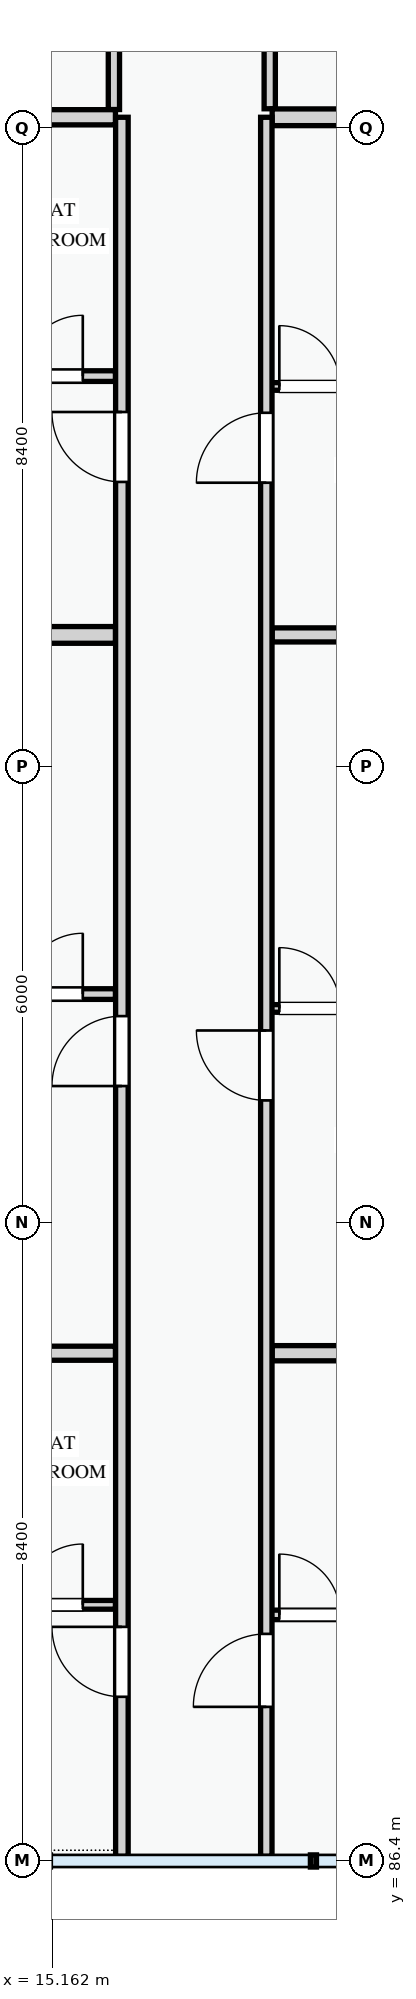
"""IFC4 building model, lengths in metres.
Left out: names, types, materials, properties, quantities, classifications, styles, units other than length and angle.
Written with IfcOpenShell. Run it as: python <this file> out.ifc"""

import sys

from ifc_helpers import new_model, si_unit, direction, frame, frame_2d, origin, place, context, subcontext, project, spatial, rectangle, extrude, element, fill, save


model = new_model("IFC4")
c1 = context("Model", 3, precision=1e-05, world=origin(), true_north=direction((0.0, 1.0)))
c2 = subcontext(c1, "Body", "Model", "MODEL_VIEW")
j1 = project(units=[si_unit("LENGTHUNIT", "METRE"), si_unit("PLANEANGLEUNIT", "RADIAN")], contexts=[c1])
p1 = place(None, origin())
s1 = spatial("IfcSite", under=j1, at=p1, CompositionType="ELEMENT")
p2 = place(p1, origin())
s2 = spatial("IfcBuilding", under=s1, at=p2, CompositionType="ELEMENT")
p3 = place(p2, frame((0.0, 0.0, 37.8)))
s3 = spatial("IfcBuildingStorey", under=s2, at=p3, CompositionType="ELEMENT", Elevation=37.8)
p4 = place(p3, frame((15.975, 113.324, 0.0), z_axis=(0.0, 0.0, 1.0), x_axis=(0.0, -1.0, 0.0)))
e1 = element("IfcWall", 1, at=p4, inside=s3, PredefinedType="PARTITIONING", context=c2, shape_type="SweptSolid", body=[
    extrude(rectangle(XDim=3.882, YDim=0.148, at=frame_2d((1.941, 0.0))), origin(), (0.0, 0.0, 1.0), 3.0),
])
p5 = place(p3, frame((18.025, 113.324, 0.0), z_axis=(0.0, 0.0, 1.0), x_axis=(0.0, -1.0, 0.0)))
e2 = element("IfcWall", 2, at=p5, inside=s3, PredefinedType="PARTITIONING", context=c2, shape_type="SweptSolid", body=[
    extrude(rectangle(XDim=3.872, YDim=0.148, at=frame_2d((1.936, 0.0))), origin(), (0.0, 0.0, 1.0), 3.0),
])
p6 = place(p3, frame((8.53, 89.77, 0.0), z_axis=(0.0, 0.0, 1.0), x_axis=(1.0, 0.0, 0.0)))
e3 = element("IfcWall", 3, at=p6, inside=s3, PredefinedType="PARTITIONING", context=c2, shape_type="SweptSolid", body=[
    extrude(rectangle(XDim=7.466, YDim=0.115, at=frame_2d((3.733, 0.0))), origin(), (0.0, 0.0, 1.0), 3.0),
])
p7 = place(p6, frame((1.334, 0.0, 0.0)))
e4 = element("IfcOpeningElement", 4, at=p7, cuts=e3, PredefinedType="OPENING", context=c2, shape_type="SweptSolid", body=[
    extrude(rectangle(XDim=0.85, YDim=2.1, at=frame_2d((0.425, 1.05))), frame((0.0, 0.067, 0.0), z_axis=(0.0, -1.0, 0.0), x_axis=(1.0, 0.0, 0.0)), (0.0, 0.0, 1.0), 0.135),
])
p8 = place(p6, frame((4.23, 0.0, 0.0)))
e5 = element("IfcOpeningElement", 5, at=p8, cuts=e3, PredefinedType="OPENING", context=c2, shape_type="SweptSolid", body=[
    extrude(rectangle(XDim=0.85, YDim=2.1, at=frame_2d((0.425, 1.05))), frame((0.0, 0.067, 0.0), z_axis=(0.0, -1.0, 0.0), x_axis=(1.0, 0.0, 0.0)), (0.0, 0.0, 1.0), 0.135),
])
p9 = place(p6, frame((6.236, 0.0, 0.0)))
e6 = element("IfcOpeningElement", 6, at=p9, cuts=e3, PredefinedType="OPENING", context=c2, shape_type="SweptSolid", body=[
    extrude(rectangle(XDim=0.8, YDim=2.1, at=frame_2d((0.4, 1.05))), frame((0.0, 0.067, 0.0), z_axis=(0.0, -1.0, 0.0), x_axis=(1.0, 0.0, 0.0)), (0.0, 0.0, 1.0), 0.135),
])
p10 = place(p3, frame((17.98, 89.638, 0.0), z_axis=(0.0, 0.0, 1.0), x_axis=(1.0, 0.0, 0.0)))
e7 = element("IfcWall", 7, at=p10, inside=s3, PredefinedType="PARTITIONING", context=c2, shape_type="SweptSolid", body=[
    extrude(rectangle(XDim=4.69, YDim=0.125, at=frame_2d((2.345, 0.0))), origin(), (0.0, 0.0, 1.0), 3.0),
])
p11 = place(p10, frame((0.171, 0.0, 0.0)))
e8 = element("IfcOpeningElement", 8, at=p11, cuts=e7, PredefinedType="OPENING", context=c2, shape_type="SweptSolid", body=[
    extrude(rectangle(XDim=0.8, YDim=2.1, at=frame_2d((0.4, 1.05))), frame((0.0, 0.073, 0.0), z_axis=(0.0, -1.0, 0.0), x_axis=(1.0, 0.0, 0.0)), (0.0, 0.0, 1.0), 0.145),
])
p12 = place(p10, frame((1.384, 0.0, 0.0)))
e9 = element("IfcOpeningElement", 9, at=p12, cuts=e7, PredefinedType="OPENING", context=c2, shape_type="SweptSolid", body=[
    extrude(rectangle(XDim=0.85, YDim=2.1, at=frame_2d((0.425, 1.05))), frame((0.0, 0.073, 0.0), z_axis=(0.0, -1.0, 0.0), x_axis=(1.0, 0.0, 0.0)), (0.0, 0.0, 1.0), 0.145),
])
p13 = place(p10, frame((3.193, 0.0, 0.0)))
e10 = element("IfcOpeningElement", 10, at=p13, cuts=e7, PredefinedType="OPENING", context=c2, shape_type="SweptSolid", body=[
    extrude(rectangle(XDim=0.85, YDim=2.1, at=frame_2d((0.425, 1.05))), frame((0.0, 0.073, 0.0), z_axis=(0.0, -1.0, 0.0), x_axis=(1.0, 0.0, 0.0)), (0.0, 0.0, 1.0), 0.145),
])
p14 = place(p3, frame((8.53, 97.805, 0.0), z_axis=(0.0, 0.0, 1.0), x_axis=(1.0, 0.0, 0.0)))
e11 = element("IfcWall", 11, at=p14, inside=s3, PredefinedType="PARTITIONING", context=c2, shape_type="SweptSolid", body=[
    extrude(rectangle(XDim=7.466, YDim=0.14, at=frame_2d((3.733, 0.0))), origin(), (0.0, 0.0, 1.0), 3.0),
])
p15 = place(p14, frame((1.334, 0.0, 0.0)))
e12 = element("IfcOpeningElement", 12, at=p15, cuts=e11, PredefinedType="OPENING", context=c2, shape_type="SweptSolid", body=[
    extrude(rectangle(XDim=0.85, YDim=2.1, at=frame_2d((0.425, 1.05))), frame((0.0, 0.08, 0.0), z_axis=(0.0, -1.0, 0.0), x_axis=(1.0, 0.0, 0.0)), (0.0, 0.0, 1.0), 0.16),
])
p16 = place(p14, frame((4.23, 0.0, 0.0)))
e13 = element("IfcOpeningElement", 13, at=p16, cuts=e11, PredefinedType="OPENING", context=c2, shape_type="SweptSolid", body=[
    extrude(rectangle(XDim=0.82, YDim=2.08, at=frame_2d((0.41, 1.04))), frame((0.0, 0.08, 0.0), z_axis=(0.0, -1.0, 0.0), x_axis=(1.0, 0.0, 0.0)), (0.0, 0.0, 1.0), 0.16),
])
p17 = place(p14, frame((6.236, 0.0, 0.0)))
e14 = element("IfcOpeningElement", 14, at=p17, cuts=e11, PredefinedType="OPENING", context=c2, shape_type="SweptSolid", body=[
    extrude(rectangle(XDim=0.8, YDim=2.1, at=frame_2d((0.4, 1.05))), frame((0.0, 0.08, 0.0), z_axis=(0.0, -1.0, 0.0), x_axis=(1.0, 0.0, 0.0)), (0.0, 0.0, 1.0), 0.16),
])
p18 = place(p3, frame((17.98, 97.616, 0.0), z_axis=(0.0, 0.0, 1.0), x_axis=(1.0, 0.0, 0.0)))
e15 = element("IfcWall", 15, at=p18, inside=s3, PredefinedType="PARTITIONING", context=c2, shape_type="SweptSolid", body=[
    extrude(rectangle(XDim=4.76, YDim=0.1, at=frame_2d((2.38, 0.0))), origin(), (0.0, 0.0, 1.0), 3.0),
])
p19 = place(p18, frame((0.171, 0.0, 0.0)))
e16 = element("IfcOpeningElement", 16, at=p19, cuts=e15, PredefinedType="OPENING", context=c2, shape_type="SweptSolid", body=[
    extrude(rectangle(XDim=0.8, YDim=2.1, at=frame_2d((0.4, 1.05))), frame((0.0, 0.06, 0.0), z_axis=(0.0, -1.0, 0.0), x_axis=(1.0, 0.0, 0.0)), (0.0, 0.0, 1.0), 0.12),
])
p20 = place(p18, frame((1.384, 0.0, 0.0)))
e17 = element("IfcOpeningElement", 17, at=p20, cuts=e15, PredefinedType="OPENING", context=c2, shape_type="SweptSolid", body=[
    extrude(rectangle(XDim=0.85, YDim=2.1, at=frame_2d((0.425, 1.05))), frame((0.0, 0.06, 0.0), z_axis=(0.0, -1.0, 0.0), x_axis=(1.0, 0.0, 0.0)), (0.0, 0.0, 1.0), 0.12),
])
p21 = place(p18, frame((3.193, 0.0, 0.0)))
e18 = element("IfcOpeningElement", 18, at=p21, cuts=e15, PredefinedType="OPENING", context=c2, shape_type="SweptSolid", body=[
    extrude(rectangle(XDim=0.82, YDim=2.08, at=frame_2d((0.41, 1.04))), frame((0.0, 0.06, 0.0), z_axis=(0.0, -1.0, 0.0), x_axis=(1.0, 0.0, 0.0)), (0.0, 0.0, 1.0), 0.12),
])
p22 = place(p3, frame((8.53, 93.08, 0.0), z_axis=(0.0, 0.0, 1.0), x_axis=(1.0, 0.0, 0.0)))
e19 = element("IfcWall", 19, at=p22, inside=s3, PredefinedType="PARTITIONING", context=c2, shape_type="SweptSolid", body=[
    extrude(rectangle(XDim=7.466, YDim=0.185, at=frame_2d((3.733, 0.0))), origin(), (0.0, 0.0, 1.0), 3.0),
])
p23 = place(p3, frame((18.057, 93.08, 0.0), z_axis=(0.0, 0.0, 1.0), x_axis=(1.0, 0.0, 0.0)))
e20 = element("IfcWall", 20, at=p23, inside=s3, PredefinedType="PARTITIONING", context=c2, shape_type="SweptSolid", body=[
    extrude(rectangle(XDim=4.614, YDim=0.2, at=frame_2d((2.307, 0.0))), origin(), (0.0, 0.0, 1.0), 3.0),
])
p24 = place(p3, frame((8.53, 105.935, 0.0), z_axis=(0.0, 0.0, 1.0), x_axis=(1.0, 0.0, 0.0)))
e21 = element("IfcWall", 21, at=p24, inside=s3, PredefinedType="PARTITIONING", context=c2, shape_type="SweptSolid", body=[
    extrude(rectangle(XDim=7.466, YDim=0.14, at=frame_2d((3.733, 0.0))), origin(), (0.0, 0.0, 1.0), 3.0),
])
p25 = place(p24, frame((1.334, 0.0, 0.0)))
e22 = element("IfcOpeningElement", 22, at=p25, cuts=e21, PredefinedType="OPENING", context=c2, shape_type="SweptSolid", body=[
    extrude(rectangle(XDim=0.85, YDim=2.1, at=frame_2d((0.425, 1.05))), frame((0.0, 0.08, 0.0), z_axis=(0.0, -1.0, 0.0), x_axis=(1.0, 0.0, 0.0)), (0.0, 0.0, 1.0), 0.16),
])
p26 = place(p24, frame((4.23, 0.0, 0.0)))
e23 = element("IfcOpeningElement", 23, at=p26, cuts=e21, PredefinedType="OPENING", context=c2, shape_type="SweptSolid", body=[
    extrude(rectangle(XDim=0.85, YDim=2.1, at=frame_2d((0.425, 1.05))), frame((0.0, 0.08, 0.0), z_axis=(0.0, -1.0, 0.0), x_axis=(1.0, 0.0, 0.0)), (0.0, 0.0, 1.0), 0.16),
])
p27 = place(p24, frame((6.236, 0.0, 0.0)))
e24 = element("IfcOpeningElement", 24, at=p27, cuts=e21, PredefinedType="OPENING", context=c2, shape_type="SweptSolid", body=[
    extrude(rectangle(XDim=0.8, YDim=2.1, at=frame_2d((0.4, 1.05))), frame((0.0, 0.08, 0.0), z_axis=(0.0, -1.0, 0.0), x_axis=(1.0, 0.0, 0.0)), (0.0, 0.0, 1.0), 0.16),
])
p28 = place(p3, frame((17.98, 105.799, 0.0), z_axis=(0.0, 0.0, 1.0), x_axis=(1.0, 0.0, 0.0)))
e25 = element("IfcWall", 25, at=p28, inside=s3, PredefinedType="PARTITIONING", context=c2, shape_type="SweptSolid", body=[
    extrude(rectangle(XDim=4.69, YDim=0.1, at=frame_2d((2.345, 0.0))), origin(), (0.0, 0.0, 1.0), 3.0),
])
p29 = place(p28, frame((0.171, 0.0, 0.0)))
e26 = element("IfcOpeningElement", 26, at=p29, cuts=e25, PredefinedType="OPENING", context=c2, shape_type="SweptSolid", body=[
    extrude(rectangle(XDim=0.8, YDim=2.1, at=frame_2d((0.4, 1.05))), frame((0.0, 0.06, 0.0), z_axis=(0.0, -1.0, 0.0), x_axis=(1.0, 0.0, 0.0)), (0.0, 0.0, 1.0), 0.12),
])
p30 = place(p28, frame((1.384, 0.0, 0.0)))
e27 = element("IfcOpeningElement", 27, at=p30, cuts=e25, PredefinedType="OPENING", context=c2, shape_type="SweptSolid", body=[
    extrude(rectangle(XDim=0.85, YDim=2.1, at=frame_2d((0.425, 1.05))), frame((0.0, 0.06, 0.0), z_axis=(0.0, -1.0, 0.0), x_axis=(1.0, 0.0, 0.0)), (0.0, 0.0, 1.0), 0.12),
])
p31 = place(p28, frame((3.193, 0.0, 0.0)))
e28 = element("IfcOpeningElement", 28, at=p31, cuts=e25, PredefinedType="OPENING", context=c2, shape_type="SweptSolid", body=[
    extrude(rectangle(XDim=0.85, YDim=2.1, at=frame_2d((0.425, 1.05))), frame((0.0, 0.06, 0.0), z_axis=(0.0, -1.0, 0.0), x_axis=(1.0, 0.0, 0.0)), (0.0, 0.0, 1.0), 0.12),
])
p32 = place(p3, frame((8.53, 102.53, 0.0), z_axis=(0.0, 0.0, 1.0), x_axis=(1.0, 0.0, 0.0)))
e29 = element("IfcWall", 29, at=p32, inside=s3, PredefinedType="PARTITIONING", context=c2, shape_type="SweptSolid", body=[
    extrude(rectangle(XDim=7.466, YDim=0.22, at=frame_2d((3.733, 0.0))), origin(), (0.0, 0.0, 1.0), 3.0),
])
p33 = place(p3, frame((18.057, 102.53, 0.0), z_axis=(0.0, 0.0, 1.0), x_axis=(1.0, 0.0, 0.0)))
e30 = element("IfcWall", 30, at=p33, inside=s3, PredefinedType="PARTITIONING", context=c2, shape_type="SweptSolid", body=[
    extrude(rectangle(XDim=4.614, YDim=0.185, at=frame_2d((2.307, 0.0))), origin(), (0.0, 0.0, 1.0), 3.0),
])
p34 = place(p3, frame((8.53, 109.34, 0.0), z_axis=(0.0, 0.0, 1.0), x_axis=(1.0, 0.0, 0.0)))
e31 = element("IfcWall", 31, at=p34, inside=s3, PredefinedType="PARTITIONING", context=c2, shape_type="SweptSolid", body=[
    extrude(rectangle(XDim=7.466, YDim=0.2, at=frame_2d((3.733, 0.0))), origin(), (0.0, 0.0, 1.0), 2.375),
])
p35 = place(p3, frame((18.057, 109.34, 0.0), z_axis=(0.0, 0.0, 1.0), x_axis=(1.0, 0.0, 0.0)))
e32 = element("IfcWall", 32, at=p35, inside=s3, PredefinedType="PARTITIONING", context=c2, shape_type="SweptSolid", body=[
    extrude(rectangle(XDim=4.683, YDim=0.22, at=frame_2d((2.342, 0.0))), origin(), (0.0, 0.0, 1.0), 2.375),
])
p36 = place(p3, frame((16.08, 86.46, 0.0), z_axis=(0.0, 0.0, 1.0), x_axis=(0.0, 1.0, 0.0)))
e33 = element("IfcWall", 33, at=p36, inside=s3, PredefinedType="PARTITIONING", context=c2, shape_type="SweptSolid", body=[
    extrude(rectangle(XDim=22.88, YDim=0.165, at=frame_2d((11.44, 0.0))), origin(), (0.0, 0.0, 1.0), 3.0),
])
p37 = place(p36, frame((2.1, 0.0, 0.0)))
e34 = element("IfcOpeningElement", 34, at=p37, cuts=e33, PredefinedType="OPENING", context=c2, shape_type="SweptSolid", body=[
    extrude(rectangle(XDim=0.92, YDim=2.1, at=frame_2d((0.46, 1.05))), frame((0.0, 0.093, 0.0), z_axis=(0.0, -1.0, 0.0), x_axis=(1.0, 0.0, 0.0)), (0.0, 0.0, 1.0), 0.185),
])
p38 = place(p36, frame((10.135, 0.0, 0.0)))
e35 = element("IfcOpeningElement", 35, at=p38, cuts=e33, PredefinedType="OPENING", context=c2, shape_type="SweptSolid", body=[
    extrude(rectangle(XDim=0.92, YDim=2.1, at=frame_2d((0.46, 1.05))), frame((0.0, 0.093, 0.0), z_axis=(0.0, -1.0, 0.0), x_axis=(1.0, 0.0, 0.0)), (0.0, 0.0, 1.0), 0.185),
])
p39 = place(p36, frame((18.083, 0.0, 0.0)))
e36 = element("IfcOpeningElement", 36, at=p39, cuts=e33, PredefinedType="OPENING", context=c2, shape_type="SweptSolid", body=[
    extrude(rectangle(XDim=0.92, YDim=2.1, at=frame_2d((0.46, 1.05))), frame((0.0, 0.093, 0.0), z_axis=(0.0, -1.0, 0.0), x_axis=(1.0, 0.0, 0.0)), (0.0, 0.0, 1.0), 0.185),
])
p40 = place(p3, frame((17.98, 86.46, 0.0), z_axis=(0.0, 0.0, 1.0), x_axis=(0.0, 1.0, 0.0)))
e37 = element("IfcWall", 37, at=p40, inside=s3, PredefinedType="PARTITIONING", context=c2, shape_type="SweptSolid", body=[
    extrude(rectangle(XDim=22.88, YDim=0.15, at=frame_2d((11.44, 0.0))), origin(), (0.0, 0.0, 1.0), 3.0),
])
p41 = place(p40, frame((1.968, 0.0, 0.0)))
e38 = element("IfcOpeningElement", 38, at=p41, cuts=e37, PredefinedType="OPENING", context=c2, shape_type="SweptSolid", body=[
    extrude(rectangle(XDim=0.96, YDim=2.12, at=frame_2d((0.48, 1.06))), frame((0.0, 0.085, 0.0), z_axis=(0.0, -1.0, 0.0), x_axis=(1.0, 0.0, 0.0)), (0.0, 0.0, 1.0), 0.17),
])
p42 = place(p40, frame((9.946, 0.0, 0.0)))
e39 = element("IfcOpeningElement", 39, at=p42, cuts=e37, PredefinedType="OPENING", context=c2, shape_type="SweptSolid", body=[
    extrude(rectangle(XDim=0.92, YDim=2.1, at=frame_2d((0.46, 1.05))), frame((0.0, 0.085, 0.0), z_axis=(0.0, -1.0, 0.0), x_axis=(1.0, 0.0, 0.0)), (0.0, 0.0, 1.0), 0.17),
])
p43 = place(p40, frame((18.072, 0.0, 0.0)))
e40 = element("IfcOpeningElement", 40, at=p43, cuts=e37, PredefinedType="OPENING", context=c2, shape_type="SweptSolid", body=[
    extrude(rectangle(XDim=0.92, YDim=2.1, at=frame_2d((0.46, 1.05))), frame((0.0, 0.085, 0.0), z_axis=(0.0, -1.0, 0.0), x_axis=(1.0, 0.0, 0.0)), (0.0, 0.0, 1.0), 0.17),
])
p44 = place(p9, origin())
e41 = element("IfcDoor", 41, at=p44, inside=s3, OperationType="SINGLE_SWING_RIGHT", PredefinedType="DOOR", context=c2, shape_type="SweptSolid", body=[
    extrude(rectangle(XDim=0.8, YDim=2.1, at=frame_2d((0.4, 1.05))), frame((0.0, 0.025, 0.0), z_axis=(0.0, -1.0, 0.0), x_axis=(1.0, 0.0, 0.0)), (0.0, 0.0, 1.0), 0.05),
])
fill(e6, e41)
p45 = place(p11, origin())
e42 = element("IfcDoor", 42, at=p45, inside=s3, OperationType="SINGLE_SWING_LEFT", PredefinedType="DOOR", context=c2, shape_type="SweptSolid", body=[
    extrude(rectangle(XDim=0.8, YDim=2.1, at=frame_2d((0.4, 1.05))), frame((0.0, 0.025, 0.0), z_axis=(0.0, -1.0, 0.0), x_axis=(1.0, 0.0, 0.0)), (0.0, 0.0, 1.0), 0.05),
])
fill(e8, e42)
p46 = place(p17, origin())
e43 = element("IfcDoor", 43, at=p46, inside=s3, OperationType="SINGLE_SWING_RIGHT", PredefinedType="DOOR", context=c2, shape_type="SweptSolid", body=[
    extrude(rectangle(XDim=0.8, YDim=2.1, at=frame_2d((0.4, 1.05))), frame((0.0, 0.025, 0.0), z_axis=(0.0, -1.0, 0.0), x_axis=(1.0, 0.0, 0.0)), (0.0, 0.0, 1.0), 0.05),
])
fill(e14, e43)
p47 = place(p19, origin())
e44 = element("IfcDoor", 44, at=p47, inside=s3, OperationType="SINGLE_SWING_LEFT", PredefinedType="DOOR", context=c2, shape_type="SweptSolid", body=[
    extrude(rectangle(XDim=0.8, YDim=2.1, at=frame_2d((0.4, 1.05))), frame((0.0, 0.025, 0.0), z_axis=(0.0, -1.0, 0.0), x_axis=(1.0, 0.0, 0.0)), (0.0, 0.0, 1.0), 0.05),
])
fill(e16, e44)
p48 = place(p27, origin())
e45 = element("IfcDoor", 45, at=p48, inside=s3, OperationType="SINGLE_SWING_RIGHT", PredefinedType="DOOR", context=c2, shape_type="SweptSolid", body=[
    extrude(rectangle(XDim=0.8, YDim=2.1, at=frame_2d((0.4, 1.05))), frame((0.0, 0.025, 0.0), z_axis=(0.0, -1.0, 0.0), x_axis=(1.0, 0.0, 0.0)), (0.0, 0.0, 1.0), 0.05),
])
fill(e24, e45)
p49 = place(p29, origin())
e46 = element("IfcDoor", 46, at=p49, inside=s3, OperationType="SINGLE_SWING_LEFT", PredefinedType="DOOR", context=c2, shape_type="SweptSolid", body=[
    extrude(rectangle(XDim=0.8, YDim=2.1, at=frame_2d((0.4, 1.05))), frame((0.0, 0.025, 0.0), z_axis=(0.0, -1.0, 0.0), x_axis=(1.0, 0.0, 0.0)), (0.0, 0.0, 1.0), 0.05),
])
fill(e26, e46)
p50 = place(p37, origin())
e47 = element("IfcDoor", 47, at=p50, inside=s3, OperationType="SINGLE_SWING_RIGHT", PredefinedType="DOOR", context=c2, shape_type="SweptSolid", body=[
    extrude(rectangle(XDim=0.92, YDim=2.1, at=frame_2d((0.46, 1.05))), frame((0.0, 0.025, 0.0), z_axis=(0.0, -1.0, 0.0), x_axis=(1.0, 0.0, 0.0)), (0.0, 0.0, 1.0), 0.05),
])
fill(e34, e47)
p51 = place(p38, origin())
e48 = element("IfcDoor", 48, at=p51, inside=s3, OperationType="SINGLE_SWING_LEFT", PredefinedType="DOOR", context=c2, shape_type="SweptSolid", body=[
    extrude(rectangle(XDim=0.92, YDim=2.1, at=frame_2d((0.46, 1.05))), frame((0.0, 0.025, 0.0), z_axis=(0.0, -1.0, 0.0), x_axis=(1.0, 0.0, 0.0)), (0.0, 0.0, 1.0), 0.05),
])
fill(e35, e48)
p52 = place(p39, origin())
e49 = element("IfcDoor", 49, at=p52, inside=s3, OperationType="SINGLE_SWING_RIGHT", PredefinedType="DOOR", context=c2, shape_type="SweptSolid", body=[
    extrude(rectangle(XDim=0.92, YDim=2.1, at=frame_2d((0.46, 1.05))), frame((0.0, 0.025, 0.0), z_axis=(0.0, -1.0, 0.0), x_axis=(1.0, 0.0, 0.0)), (0.0, 0.0, 1.0), 0.05),
])
fill(e36, e49)
p53 = place(p41, origin())
e50 = element("IfcDoor", 50, at=p53, inside=s3, OperationType="SINGLE_SWING_LEFT", PredefinedType="DOOR", context=c2, shape_type="SweptSolid", body=[
    extrude(rectangle(XDim=0.96, YDim=2.12, at=frame_2d((0.48, 1.06))), frame((0.0, 0.025, 0.0), z_axis=(0.0, -1.0, 0.0), x_axis=(1.0, 0.0, 0.0)), (0.0, 0.0, 1.0), 0.05),
])
fill(e38, e50)
p54 = place(p42, origin())
e51 = element("IfcDoor", 51, at=p54, inside=s3, OperationType="SINGLE_SWING_RIGHT", PredefinedType="DOOR", context=c2, shape_type="SweptSolid", body=[
    extrude(rectangle(XDim=0.92, YDim=2.1, at=frame_2d((0.46, 1.05))), frame((0.0, 0.025, 0.0), z_axis=(0.0, -1.0, 0.0), x_axis=(1.0, 0.0, 0.0)), (0.0, 0.0, 1.0), 0.05),
])
fill(e39, e51)
p55 = place(p43, origin())
e52 = element("IfcDoor", 52, at=p55, inside=s3, OperationType="SINGLE_SWING_LEFT", PredefinedType="DOOR", context=c2, shape_type="SweptSolid", body=[
    extrude(rectangle(XDim=0.92, YDim=2.1, at=frame_2d((0.46, 1.05))), frame((0.0, 0.025, 0.0), z_axis=(0.0, -1.0, 0.0), x_axis=(1.0, 0.0, 0.0)), (0.0, 0.0, 1.0), 0.05),
])
fill(e40, e52)
save(model, sys.argv[1])
